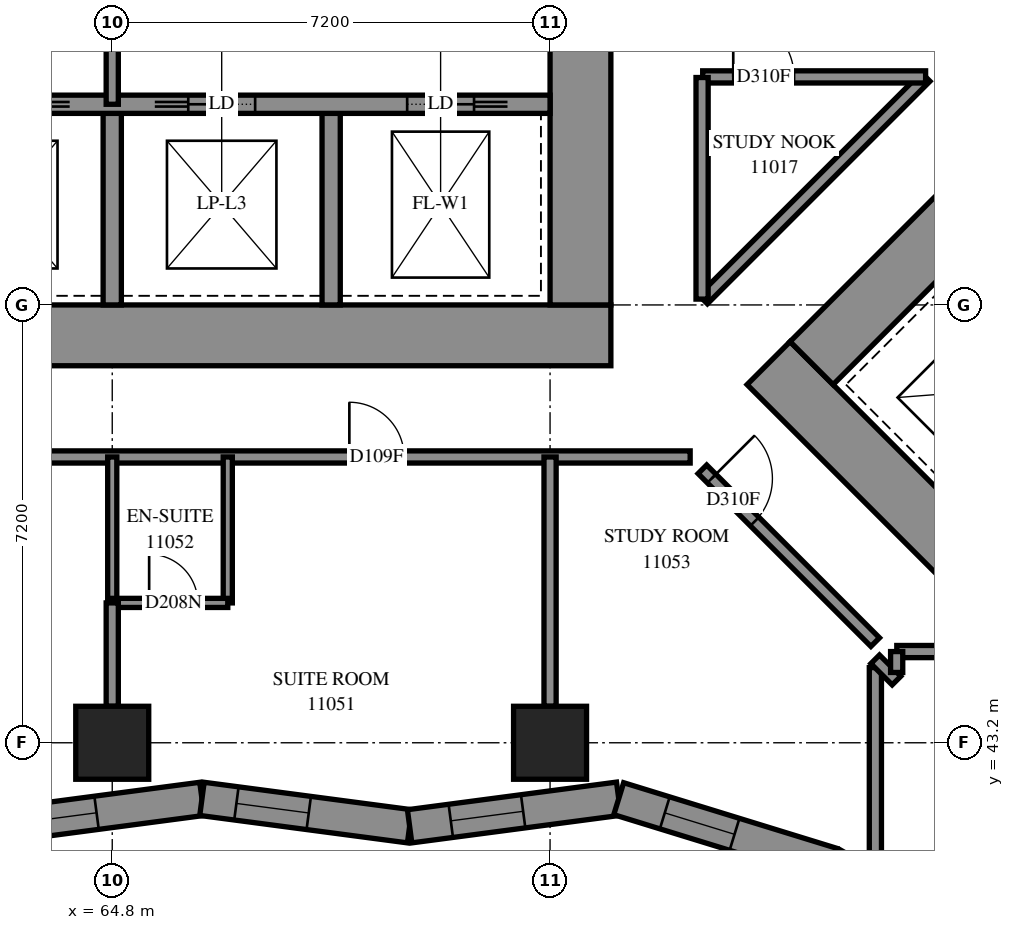
"""IFC4 building model, lengths in metres.
Left out: names, types, materials, properties, quantities, classifications, styles, units other than length and angle.
Written with IfcOpenShell. Run it as: python <this file> out.ifc"""

import sys

from ifc_helpers import new_model, si_unit, direction, frame, frame_2d, origin, origin_2d, place, context, subcontext, project, spatial, polyline, rectangle, outline, extrude, element, fill, save


model = new_model("IFC4")
c1 = context("Model", 3, precision=1e-05, world=origin(), true_north=direction((0.0, 1.0)))
c2 = subcontext(c1, "Body", "Model", "MODEL_VIEW")
j1 = project(units=[si_unit("LENGTHUNIT", "METRE"), si_unit("PLANEANGLEUNIT", "RADIAN")], contexts=[c1])
p1 = place(None, origin())
s1 = spatial("IfcSite", under=j1, at=p1, CompositionType="ELEMENT")
p2 = place(p1, origin())
s2 = spatial("IfcBuilding", under=s1, at=p2, CompositionType="ELEMENT")
p3 = place(p2, frame((0.0, 0.0, 44.0)))
s3 = spatial("IfcBuildingStorey", under=s2, at=p3, CompositionType="ELEMENT", Elevation=44.0)
for number, where, z_axis, x_axis in (
    (1, (64.8, 43.2, 0.0), (0.0, 0.0, 1.0), (1.0, 0.0, 0.0)),
    (2, (72.0, 43.2, 0.0), (0.0, 0.0, 1.0), (1.0, 0.0, 0.0)),
):
    element("IfcColumn", number, at=place(p3, frame(where, z_axis=z_axis, x_axis=x_axis)), inside=s3, PredefinedType="COLUMN", context=c2, shape_type="SweptSolid", body=[
        extrude(rectangle(XDim=1.2, YDim=1.2, at=origin_2d()), origin(), (0.0, 0.0, 1.0), 3.1),
    ])
p4 = place(p3, frame((56.6, 49.9, -0.3), z_axis=(0.0, 0.0, 1.0), x_axis=(1.0, 0.0, 0.0)))
e3 = element("IfcWall", 3, at=p4, inside=s3, PredefinedType="SHEAR", context=c2, shape_type="SweptSolid", body=[
    extrude(rectangle(XDim=16.4, YDim=1.0, at=frame_2d((8.2, 0.0))), origin(), (0.0, 0.0, 1.0), 2.7),
])
p5 = place(p3, frame((72.5, 50.4, -0.3), z_axis=(0.0, 0.0, 1.0), x_axis=(0.0, 1.0, 0.0)))
e4 = element("IfcWall", 4, at=p5, inside=s3, PredefinedType="SHEAR", context=c2, shape_type="SweptSolid", body=[
    extrude(rectangle(XDim=14.4, YDim=1.0, at=frame_2d((7.2, 0.0))), origin(), (0.0, 0.0, 1.0), 2.7),
])
p6 = place(p5, frame((4.55, 0.0, 0.3)))
e5 = element("IfcOpeningElement", 5, at=p6, cuts=e4, PredefinedType="OPENING", context=c2, shape_type="SweptSolid", body=[
    extrude(rectangle(XDim=1.1, YDim=2.1, at=frame_2d((0.55, 1.05))), frame((0.0, 0.51, 0.0), z_axis=(0.0, -1.0, 0.0), x_axis=(1.0, 0.0, 0.0)), (0.0, 0.0, 1.0), 1.02),
])
p7 = place(p5, frame((11.35, 0.0, 0.3)))
e6 = element("IfcOpeningElement", 6, at=p7, cuts=e4, PredefinedType="OPENING", context=c2, shape_type="SweptSolid", body=[
    extrude(rectangle(XDim=1.1, YDim=2.1, at=frame_2d((0.55, 1.05))), frame((0.0, 0.51, 0.0), z_axis=(0.0, -1.0, 0.0), x_axis=(1.0, 0.0, 0.0)), (0.0, 0.0, 1.0), 1.02),
])
for number, where, z_axis, x_axis in (
    (7, (64.8, 50.4, 0.0), (0.0, 0.0, 1.0), (0.0, 1.0, 0.0)),
    (8, (68.4, 50.4, 0.0), (0.0, 0.0, 1.0), (0.0, 1.0, 0.0)),
):
    element("IfcWall", number, at=place(p3, frame(where, z_axis=z_axis, x_axis=x_axis)), inside=s3, PredefinedType="SOLIDWALL", context=c2, shape_type="SweptSolid", body=[
        extrude(rectangle(XDim=3.3, YDim=0.3, at=frame_2d((1.65, 0.0))), origin(), (0.0, 0.0, 1.0), 3.1),
    ])
p8 = place(p3, frame((57.6, 53.7, 0.0), z_axis=(0.0, 0.0, 1.0), x_axis=(1.0, 0.0, 0.0)))
e9 = element("IfcWall", 9, at=p8, inside=s3, PredefinedType="SOLIDWALL", context=c2, shape_type="SweptSolid", body=[
    extrude(rectangle(XDim=14.4, YDim=0.3, at=frame_2d((7.2, 0.0))), origin(), (0.0, 0.0, 1.0), 3.1),
])
p9 = place(p8, frame((1.25, 0.0, 0.0)))
e10 = element("IfcOpeningElement", 10, at=p9, cuts=e9, PredefinedType="OPENING", context=c2, shape_type="SweptSolid", body=[
    extrude(rectangle(XDim=1.1, YDim=2.1, at=frame_2d((0.55, 1.05))), frame((0.0, 0.16, 0.0), z_axis=(0.0, -1.0, 0.0), x_axis=(1.0, 0.0, 0.0)), (0.0, 0.0, 1.0), 0.32),
])
p10 = place(p8, frame((4.85, 0.0, 0.0)))
e11 = element("IfcOpeningElement", 11, at=p10, cuts=e9, PredefinedType="OPENING", context=c2, shape_type="SweptSolid", body=[
    extrude(rectangle(XDim=1.1, YDim=2.1, at=frame_2d((0.55, 1.05))), frame((0.0, 0.16, 0.0), z_axis=(0.0, -1.0, 0.0), x_axis=(1.0, 0.0, 0.0)), (0.0, 0.0, 1.0), 0.32),
])
p11 = place(p8, frame((8.45, 0.0, 0.0)))
e12 = element("IfcOpeningElement", 12, at=p11, cuts=e9, PredefinedType="OPENING", context=c2, shape_type="SweptSolid", body=[
    extrude(rectangle(XDim=1.1, YDim=2.1, at=frame_2d((0.55, 1.05))), frame((0.0, 0.16, 0.0), z_axis=(0.0, -1.0, 0.0), x_axis=(1.0, 0.0, 0.0)), (0.0, 0.0, 1.0), 0.32),
])
p12 = place(p8, frame((12.05, 0.0, 0.0)))
e13 = element("IfcOpeningElement", 13, at=p12, cuts=e9, PredefinedType="OPENING", context=c2, shape_type="SweptSolid", body=[
    extrude(rectangle(XDim=1.1, YDim=2.1, at=frame_2d((0.55, 1.05))), frame((0.0, 0.16, 0.0), z_axis=(0.0, -1.0, 0.0), x_axis=(1.0, 0.0, 0.0)), (0.0, 0.0, 1.0), 0.32),
])
p13 = place(p3, frame((75.594, 49.443, -0.3), z_axis=(0.0, 0.0, 1.0), x_axis=(0.7071037324, -0.70710983, 0.0)))
e14 = element("IfcWall", 14, at=p13, inside=s3, PredefinedType="SHEAR", context=c2, shape_type="SweptSolid", body=[
    extrude(rectangle(XDim=16.4, YDim=1.0, at=frame_2d((8.2, 0.0))), origin(), (0.0, 0.0, 1.0), 2.7),
])
p14 = place(p3, frame((76.301, 49.443, -0.3), z_axis=(0.0, 0.0, 1.0), x_axis=(0.7071067812, 0.7071067812, 0.0)))
e15 = element("IfcWall", 15, at=p14, inside=s3, PredefinedType="SHEAR", context=c2, shape_type="SweptSolid", body=[
    extrude(rectangle(XDim=14.4, YDim=1.0, at=frame_2d((7.2, 0.0))), origin(), (0.0, 0.0, 1.0), 2.7),
])
p15 = place(p14, frame((4.55, 0.0, 0.3)))
e16 = element("IfcOpeningElement", 16, at=p15, cuts=e15, PredefinedType="OPENING", context=c2, shape_type="SweptSolid", body=[
    extrude(rectangle(XDim=1.1, YDim=2.1, at=frame_2d((0.55, 1.05))), frame((0.0, 0.51, 0.0), z_axis=(0.0, -1.0, 0.0), x_axis=(1.0, 0.0, 0.0)), (0.0, 0.0, 1.0), 1.02),
])
p16 = place(p14, frame((11.35, 0.0, 0.3)))
e17 = element("IfcOpeningElement", 17, at=p16, cuts=e15, PredefinedType="OPENING", context=c2, shape_type="SweptSolid", body=[
    extrude(rectangle(XDim=1.1, YDim=2.1, at=frame_2d((0.55, 1.05))), frame((0.0, 0.51, 0.0), z_axis=(0.0, -1.0, 0.0), x_axis=(1.0, 0.0, 0.0)), (0.0, 0.0, 1.0), 1.02),
])
p17 = place(p3, frame((62.86, 41.826, 0.0), z_axis=(0.0, 0.0, 1.0), x_axis=(0.9913924297, 0.1309238341, 0.0)))
e18 = element("IfcWall", 18, at=p17, inside=s3, PredefinedType="SOLIDWALL", context=c2, shape_type="SweptSolid", body=[
    extrude(outline(polyline([(-0.036, -0.275), (3.408, -0.275), (3.481, 0.275), (0.036, 0.275), (-0.036, -0.275)])), origin(), (0.0, 0.0, 1.0), 3.1),
])
p18 = place(p17, frame((0.496, 0.0, 0.5)))
e19 = element("IfcOpeningElement", 19, at=p18, cuts=e18, PredefinedType="OPENING", context=c2, shape_type="SweptSolid", body=[
    extrude(rectangle(XDim=1.2, YDim=2.45, at=frame_2d((0.6, 1.225))), frame((0.0, 0.285, 0.0), z_axis=(0.0, -1.0, 0.0), x_axis=(1.0, 0.0, 0.0)), (0.0, 0.0, 1.0), 0.57),
])
p19 = place(p3, frame((66.275, 42.277, 0.0), z_axis=(0.0, 0.0, 1.0), x_axis=(0.9913919321, -0.1309276022, 0.0)))
e20 = element("IfcWall", 20, at=p19, inside=s3, PredefinedType="SOLIDWALL", context=c2, shape_type="SweptSolid", body=[
    extrude(outline(polyline([(0.036, -0.275), (3.481, -0.275), (3.408, 0.275), (-0.036, 0.275), (0.036, -0.275)])), origin(), (0.0, 0.0, 1.0), 3.1),
])
p20 = place(p19, frame((0.572, 0.0, 0.5)))
e21 = element("IfcOpeningElement", 21, at=p20, cuts=e20, PredefinedType="OPENING", context=c2, shape_type="SweptSolid", body=[
    extrude(rectangle(XDim=1.2, YDim=2.45, at=frame_2d((0.6, 1.225))), frame((0.0, 0.285, 0.0), z_axis=(0.0, -1.0, 0.0), x_axis=(1.0, 0.0, 0.0)), (0.0, 0.0, 1.0), 0.57),
])
p21 = place(p3, frame((69.69, 41.826, 0.0), z_axis=(0.0, 0.0, 1.0), x_axis=(0.9913925578, 0.1309228641, 0.0)))
e22 = element("IfcWall", 22, at=p21, inside=s3, PredefinedType="SOLIDWALL", context=c2, shape_type="SweptSolid", body=[
    extrude(outline(polyline([(-0.036, -0.275), (3.408, -0.275), (3.529, 0.275), (0.036, 0.275), (-0.036, -0.275)])), origin(), (0.0, 0.0, 1.0), 3.1),
])
p22 = place(p21, frame((0.683, 0.0, 0.5)))
e23 = element("IfcOpeningElement", 23, at=p22, cuts=e22, PredefinedType="OPENING", context=c2, shape_type="SweptSolid", body=[
    extrude(rectangle(XDim=1.2, YDim=2.45, at=frame_2d((0.6, 1.225))), frame((0.0, 0.285, 0.0), z_axis=(0.0, -1.0, 0.0), x_axis=(1.0, 0.0, 0.0)), (0.0, 0.0, 1.0), 0.57),
])
p23 = place(p3, frame((73.129, 42.281, 0.0), z_axis=(0.0, 0.0, 1.0), x_axis=(0.9557595319, -0.2941491411, 0.0)))
e24 = element("IfcWall", 24, at=p23, inside=s3, PredefinedType="SOLIDWALL", context=c2, shape_type="SweptSolid", body=[
    extrude(outline(polyline([(0.06, -0.275), (3.633, -0.275), (3.694, 0.275), (-0.06, 0.275), (0.06, -0.275)])), origin(), (0.0, 0.0, 1.0), 3.1),
])
p24 = place(p23, frame((0.793, 0.0, 0.5)))
e25 = element("IfcOpeningElement", 25, at=p24, cuts=e24, PredefinedType="OPENING", context=c2, shape_type="SweptSolid", body=[
    extrude(rectangle(XDim=1.2, YDim=2.45, at=frame_2d((0.6, 1.225))), frame((0.0, 0.285, 0.0), z_axis=(0.0, -1.0, 0.0), x_axis=(1.0, 0.0, 0.0)), (0.0, 0.0, 1.0), 0.57),
])
p25 = place(p3, frame((76.631, 41.203, 0.0), z_axis=(0.0, 0.0, 1.0), x_axis=(0.8675936053, -0.4972739044, 0.0)))
e26 = element("IfcWall", 26, at=p25, inside=s3, PredefinedType="SOLIDWALL", context=c2, shape_type="SweptSolid", body=[
    extrude(outline(polyline([(0.031, -0.275), (4.045, -0.275), (4.151, 0.275), (-0.031, 0.275), (0.031, -0.275)])), origin(), (0.0, 0.0, 1.0), 3.1),
])
p26 = place(p25, frame((2.198, 0.0, 0.5)))
e27 = element("IfcOpeningElement", 27, at=p26, cuts=e26, PredefinedType="OPENING", context=c2, shape_type="SweptSolid", body=[
    extrude(rectangle(XDim=1.2, YDim=2.45, at=frame_2d((0.6, 1.225))), frame((0.0, 0.285, 0.0), z_axis=(0.0, -1.0, 0.0), x_axis=(1.0, 0.0, 0.0)), (0.0, 0.0, 1.0), 0.57),
])
p27 = place(p25, frame((0.86, 0.0, 0.45)))
e28 = element("IfcOpeningElement", 28, at=p27, cuts=e26, PredefinedType="OPENING", context=c2, shape_type="SweptSolid", body=[
    extrude(rectangle(XDim=0.8, YDim=2.5, at=frame_2d((0.4, 1.25))), frame((0.0, 0.285, 0.0), z_axis=(0.0, -1.0, 0.0), x_axis=(1.0, 0.0, 0.0)), (0.0, 0.0, 1.0), 0.57),
])
p28 = place(p3, frame((64.8, 53.7, 0.0), z_axis=(0.0, 0.0, 1.0), x_axis=(0.0, 1.0, 0.0)))
e29 = element("IfcWall", 29, at=p28, inside=s3, PredefinedType="PARTITIONING", context=c2, shape_type="SweptSolid", body=[
    extrude(rectangle(XDim=3.6, YDim=0.2, at=frame_2d((1.8, 0.0))), origin(), (0.0, 0.0, 1.0), 3.1),
])
p29 = place(p3, frame((55.1, 47.9, 0.0), z_axis=(0.0, 0.0, 1.0), x_axis=(1.0, 0.0, 0.0)))
e30 = element("IfcWall", 30, at=p29, inside=s3, PredefinedType="PARTITIONING", context=c2, shape_type="SweptSolid", body=[
    extrude(rectangle(XDim=19.204, YDim=0.2, at=frame_2d((9.602, 0.0))), origin(), (0.0, 0.0, 1.0), 3.1),
])
p30 = place(p29, frame((6.399, 0.0, 0.0)))
e31 = element("IfcOpeningElement", 31, at=p30, cuts=e30, PredefinedType="OPENING", context=c2, shape_type="SweptSolid", body=[
    extrude(rectangle(XDim=0.9, YDim=2.1, at=frame_2d((0.45, 1.05))), frame((0.0, 0.11, 0.0), z_axis=(0.0, -1.0, 0.0), x_axis=(1.0, 0.0, 0.0)), (0.0, 0.0, 1.0), 0.22),
])
p31 = place(p29, frame((13.599, 0.0, 0.0)))
e32 = element("IfcOpeningElement", 32, at=p31, cuts=e30, PredefinedType="OPENING", context=c2, shape_type="SweptSolid", body=[
    extrude(rectangle(XDim=0.9, YDim=2.1, at=frame_2d((0.45, 1.05))), frame((0.0, 0.11, 0.0), z_axis=(0.0, -1.0, 0.0), x_axis=(1.0, 0.0, 0.0)), (0.0, 0.0, 1.0), 0.22),
])
p32 = place(p3, frame((74.517, 50.489, 0.0), z_axis=(0.0, 0.0, 1.0), x_axis=(0.7071067812, 0.7071067812, 0.0)))
e33 = element("IfcWall", 33, at=p32, inside=s3, PredefinedType="PARTITIONING", context=c2, shape_type="SweptSolid", body=[
    extrude(rectangle(XDim=5.176, YDim=0.2, at=frame_2d((2.588, 0.0))), origin(), (0.0, 0.0, 1.0), 3.1),
])
p33 = place(p3, frame((72.0, 43.8, 0.0), z_axis=(0.0, 0.0, 1.0), x_axis=(0.0, 1.0, 0.0)))
e34 = element("IfcWall", 34, at=p33, inside=s3, PredefinedType="PARTITIONING", context=c2, shape_type="SweptSolid", body=[
    extrude(rectangle(XDim=4.1, YDim=0.2, at=frame_2d((2.05, 0.0))), origin(), (0.0, 0.0, 1.0), 3.1),
])
p34 = place(p3, frame((74.505, 47.697, 0.0), z_axis=(0.0, 0.0, 1.0), x_axis=(0.7071067812, -0.7071067812, 0.0)))
e35 = element("IfcWall", 35, at=p34, inside=s3, PredefinedType="PARTITIONING", context=c2, shape_type="SweptSolid", body=[
    extrude(rectangle(XDim=4.019, YDim=0.2, at=frame_2d((2.01, 0.0))), origin(), (0.0, 0.0, 1.0), 3.1),
])
p35 = place(p34, frame((0.215, 0.0, 0.0)))
e36 = element("IfcOpeningElement", 36, at=p35, cuts=e35, PredefinedType="OPENING", context=c2, shape_type="SweptSolid", body=[
    extrude(rectangle(XDim=1.0, YDim=2.1, at=frame_2d((0.5, 1.05))), frame((0.0, 0.11, 0.0), z_axis=(0.0, -1.0, 0.0), x_axis=(1.0, 0.0, 0.0)), (0.0, 0.0, 1.0), 0.22),
])
p36 = place(p3, frame((74.51, 54.15, 0.0), z_axis=(0.0, 0.0, 1.0), x_axis=(1.0, 0.0, 0.0)))
e37 = element("IfcWall", 37, at=p36, inside=s3, PredefinedType="PARTITIONING", context=c2, shape_type="SweptSolid", body=[
    extrude(rectangle(XDim=3.666, YDim=0.2, at=frame_2d((1.833, 0.0))), origin(), (0.0, 0.0, 1.0), 3.1),
])
p37 = place(p36, frame((0.502, 0.0, 0.0)))
e38 = element("IfcOpeningElement", 38, at=p37, cuts=e37, PredefinedType="OPENING", context=c2, shape_type="SweptSolid", body=[
    extrude(rectangle(XDim=1.0, YDim=2.1, at=frame_2d((0.5, 1.05))), frame((0.0, 0.11, 0.0), z_axis=(0.0, -1.0, 0.0), x_axis=(1.0, 0.0, 0.0)), (0.0, 0.0, 1.0), 0.22),
])
p38 = place(p3, frame((74.5, 50.496, 0.0), z_axis=(0.0, 0.0, 1.0), x_axis=(0.0, 1.0, 0.0)))
e39 = element("IfcWall", 39, at=p38, inside=s3, PredefinedType="PARTITIONING", context=c2, shape_type="SweptSolid", body=[
    extrude(rectangle(XDim=3.644, YDim=0.2, at=frame_2d((1.822, 0.0))), origin(), (0.0, 0.0, 1.0), 3.1),
])
p39 = place(p3, frame((77.35, 41.108, 0.0), z_axis=(0.0, 0.0, 1.0), x_axis=(0.0, 1.0, 0.0)))
e40 = element("IfcWall", 40, at=p39, inside=s3, PredefinedType="PARTITIONING", context=c2, shape_type="SweptSolid", body=[
    extrude(rectangle(XDim=3.329, YDim=0.2, at=frame_2d((1.664, 0.0))), origin(), (0.0, 0.0, 1.0), 3.1),
])
for number, where, z_axis, x_axis in (
    (41, (66.7, 45.5, 0.0), (0.0, 0.0, 1.0), (0.0, 1.0, 0.0)),
    (42, (64.8, 45.5, 0.0), (0.0, 0.0, 1.0), (0.0, 1.0, 0.0)),
):
    element("IfcWall", number, at=place(p3, frame(where, z_axis=z_axis, x_axis=x_axis)), inside=s3, PredefinedType="PARTITIONING", context=c2, shape_type="SweptSolid", body=[
        extrude(rectangle(XDim=2.4, YDim=0.15, at=frame_2d((1.2, 0.0))), origin(), (0.0, 0.0, 1.0), 3.1),
    ])
p40 = place(p3, frame((64.8, 45.5, 0.0), z_axis=(0.0, 0.0, 1.0), x_axis=(1.0, 0.0, 0.0)))
e43 = element("IfcWall", 43, at=p40, inside=s3, PredefinedType="PARTITIONING", context=c2, shape_type="SweptSolid", body=[
    extrude(rectangle(XDim=1.9, YDim=0.15, at=frame_2d((0.95, 0.0))), origin(), (0.0, 0.0, 1.0), 3.1),
])
p41 = place(p40, frame((0.607, 0.0, 0.0)))
e44 = element("IfcOpeningElement", 44, at=p41, cuts=e43, PredefinedType="OPENING", context=c2, shape_type="SweptSolid", body=[
    extrude(rectangle(XDim=0.8, YDim=2.1, at=frame_2d((0.4, 1.05))), frame((0.0, 0.085, 0.0), z_axis=(0.0, -1.0, 0.0), x_axis=(1.0, 0.0, 0.0)), (0.0, 0.0, 1.0), 0.17),
])
p42 = place(p3, frame((77.702, 44.7, 0.0), z_axis=(0.0, 0.0, 1.0), x_axis=(1.0, 0.0, 0.0)))
e45 = element("IfcWall", 45, at=p42, inside=s3, PredefinedType="PARTITIONING", context=c2, shape_type="SweptSolid", body=[
    extrude(rectangle(XDim=1.814, YDim=0.2, at=frame_2d((0.907, 0.0))), origin(), (0.0, 0.0, 1.0), 3.1),
])
p43 = place(p3, frame((64.8, 43.8, 0.0), z_axis=(0.0, 0.0, 1.0), x_axis=(0.0, 1.0, 0.0)))
e46 = element("IfcWall", 46, at=p43, inside=s3, PredefinedType="PARTITIONING", context=c2, shape_type="SweptSolid", body=[
    extrude(rectangle(XDim=1.7, YDim=0.2, at=frame_2d((0.85, 0.0))), origin(), (0.0, 0.0, 1.0), 3.1),
])
p44 = place(p3, frame((77.347, 44.573, 0.0), z_axis=(0.0, 0.0, 1.0), x_axis=(0.7071067812, -0.7071067812, 0.0)))
e47 = element("IfcWall", 47, at=p44, inside=s3, PredefinedType="PARTITIONING", context=c2, shape_type="SweptSolid", body=[
    extrude(rectangle(XDim=0.495, YDim=0.2, at=frame_2d((0.247, 0.0))), origin(), (0.0, 0.0, 1.0), 3.1),
])
p45 = place(p3, frame((77.7, 44.356, 0.0), z_axis=(0.0, 0.0, 1.0), x_axis=(0.0, 1.0, 0.0)))
e48 = element("IfcWall", 48, at=p45, inside=s3, PredefinedType="PARTITIONING", context=c2, shape_type="SweptSolid", body=[
    extrude(rectangle(XDim=0.344, YDim=0.2, at=frame_2d((0.172, 0.0))), origin(), (0.0, 0.0, 1.0), 3.1),
])
p46 = place(p18, origin())
e49 = element("IfcWindow", 49, at=p46, inside=s3, PartitioningType="SINGLE_PANEL", PredefinedType="WINDOW", context=c2, shape_type="SweptSolid", body=[
    extrude(rectangle(XDim=1.2, YDim=2.45, at=frame_2d((0.6, 1.225))), frame((0.0, 0.155, 0.0), z_axis=(0.0, -1.0, 0.0), x_axis=(1.0, 0.0, 0.0)), (0.0, 0.0, 1.0), 0.06),
])
fill(e19, e49)
p47 = place(p20, origin())
e50 = element("IfcWindow", 50, at=p47, inside=s3, PartitioningType="SINGLE_PANEL", PredefinedType="WINDOW", context=c2, shape_type="SweptSolid", body=[
    extrude(rectangle(XDim=1.2, YDim=2.45, at=frame_2d((0.6, 1.225))), frame((0.0, 0.155, 0.0), z_axis=(0.0, -1.0, 0.0), x_axis=(1.0, 0.0, 0.0)), (0.0, 0.0, 1.0), 0.06),
])
fill(e21, e50)
p48 = place(p22, origin())
e51 = element("IfcWindow", 51, at=p48, inside=s3, PartitioningType="SINGLE_PANEL", PredefinedType="WINDOW", context=c2, shape_type="SweptSolid", body=[
    extrude(rectangle(XDim=1.2, YDim=2.45, at=frame_2d((0.6, 1.225))), frame((0.0, 0.155, 0.0), z_axis=(0.0, -1.0, 0.0), x_axis=(1.0, 0.0, 0.0)), (0.0, 0.0, 1.0), 0.06),
])
fill(e23, e51)
p49 = place(p24, origin())
e52 = element("IfcWindow", 52, at=p49, inside=s3, PartitioningType="SINGLE_PANEL", PredefinedType="WINDOW", context=c2, shape_type="SweptSolid", body=[
    extrude(rectangle(XDim=1.2, YDim=2.45, at=frame_2d((0.6, 1.225))), frame((0.0, 0.155, 0.0), z_axis=(0.0, -1.0, 0.0), x_axis=(1.0, 0.0, 0.0)), (0.0, 0.0, 1.0), 0.06),
])
fill(e25, e52)
p50 = place(p11, origin())
e53 = element("IfcDoor", 53, at=p50, inside=s3, OperationType="SLIDING_TO_LEFT", PredefinedType="DOOR", context=c2, shape_type="SweptSolid", body=[
    extrude(rectangle(XDim=1.1, YDim=2.1, at=frame_2d((0.55, 1.05))), frame((0.0, 0.025, 0.0), z_axis=(0.0, -1.0, 0.0), x_axis=(1.0, 0.0, 0.0)), (0.0, 0.0, 1.0), 0.05),
])
fill(e12, e53)
p51 = place(p12, origin())
e54 = element("IfcDoor", 54, at=p51, inside=s3, OperationType="SLIDING_TO_RIGHT", PredefinedType="DOOR", context=c2, shape_type="SweptSolid", body=[
    extrude(rectangle(XDim=1.1, YDim=2.1, at=frame_2d((0.55, 1.05))), frame((0.0, 0.025, 0.0), z_axis=(0.0, -1.0, 0.0), x_axis=(1.0, 0.0, 0.0)), (0.0, 0.0, 1.0), 0.05),
])
fill(e13, e54)
p52 = place(p37, origin())
e55 = element("IfcDoor", 55, at=p52, inside=s3, OperationType="SINGLE_SWING_RIGHT", PredefinedType="DOOR", context=c2, shape_type="SweptSolid", body=[
    extrude(rectangle(XDim=1.0, YDim=2.1, at=frame_2d((0.5, 1.05))), frame((0.0, 0.025, 0.0), z_axis=(0.0, -1.0, 0.0), x_axis=(1.0, 0.0, 0.0)), (0.0, 0.0, 1.0), 0.05),
])
fill(e38, e55)
p53 = place(p31, origin())
e56 = element("IfcDoor", 56, at=p53, inside=s3, OperationType="SINGLE_SWING_LEFT", PredefinedType="DOOR", context=c2, shape_type="SweptSolid", body=[
    extrude(rectangle(XDim=0.9, YDim=2.1, at=frame_2d((0.45, 1.05))), frame((0.0, 0.025, 0.0), z_axis=(0.0, -1.0, 0.0), x_axis=(1.0, 0.0, 0.0)), (0.0, 0.0, 1.0), 0.05),
])
fill(e32, e56)
p54 = place(p41, origin())
e57 = element("IfcDoor", 57, at=p54, inside=s3, OperationType="SINGLE_SWING_RIGHT", PredefinedType="DOOR", context=c2, shape_type="SweptSolid", body=[
    extrude(rectangle(XDim=0.8, YDim=2.1, at=frame_2d((0.4, 1.05))), frame((0.0, 0.025, 0.0), z_axis=(0.0, -1.0, 0.0), x_axis=(1.0, 0.0, 0.0)), (0.0, 0.0, 1.0), 0.05),
])
fill(e44, e57)
p55 = place(p35, origin())
e58 = element("IfcDoor", 58, at=p55, inside=s3, OperationType="SINGLE_SWING_LEFT", PredefinedType="DOOR", context=c2, shape_type="SweptSolid", body=[
    extrude(rectangle(XDim=1.0, YDim=2.1, at=frame_2d((0.5, 1.05))), frame((0.0, 0.025, 0.0), z_axis=(0.0, -1.0, 0.0), x_axis=(1.0, 0.0, 0.0)), (0.0, 0.0, 1.0), 0.05),
])
fill(e36, e58)
save(model, sys.argv[1])
